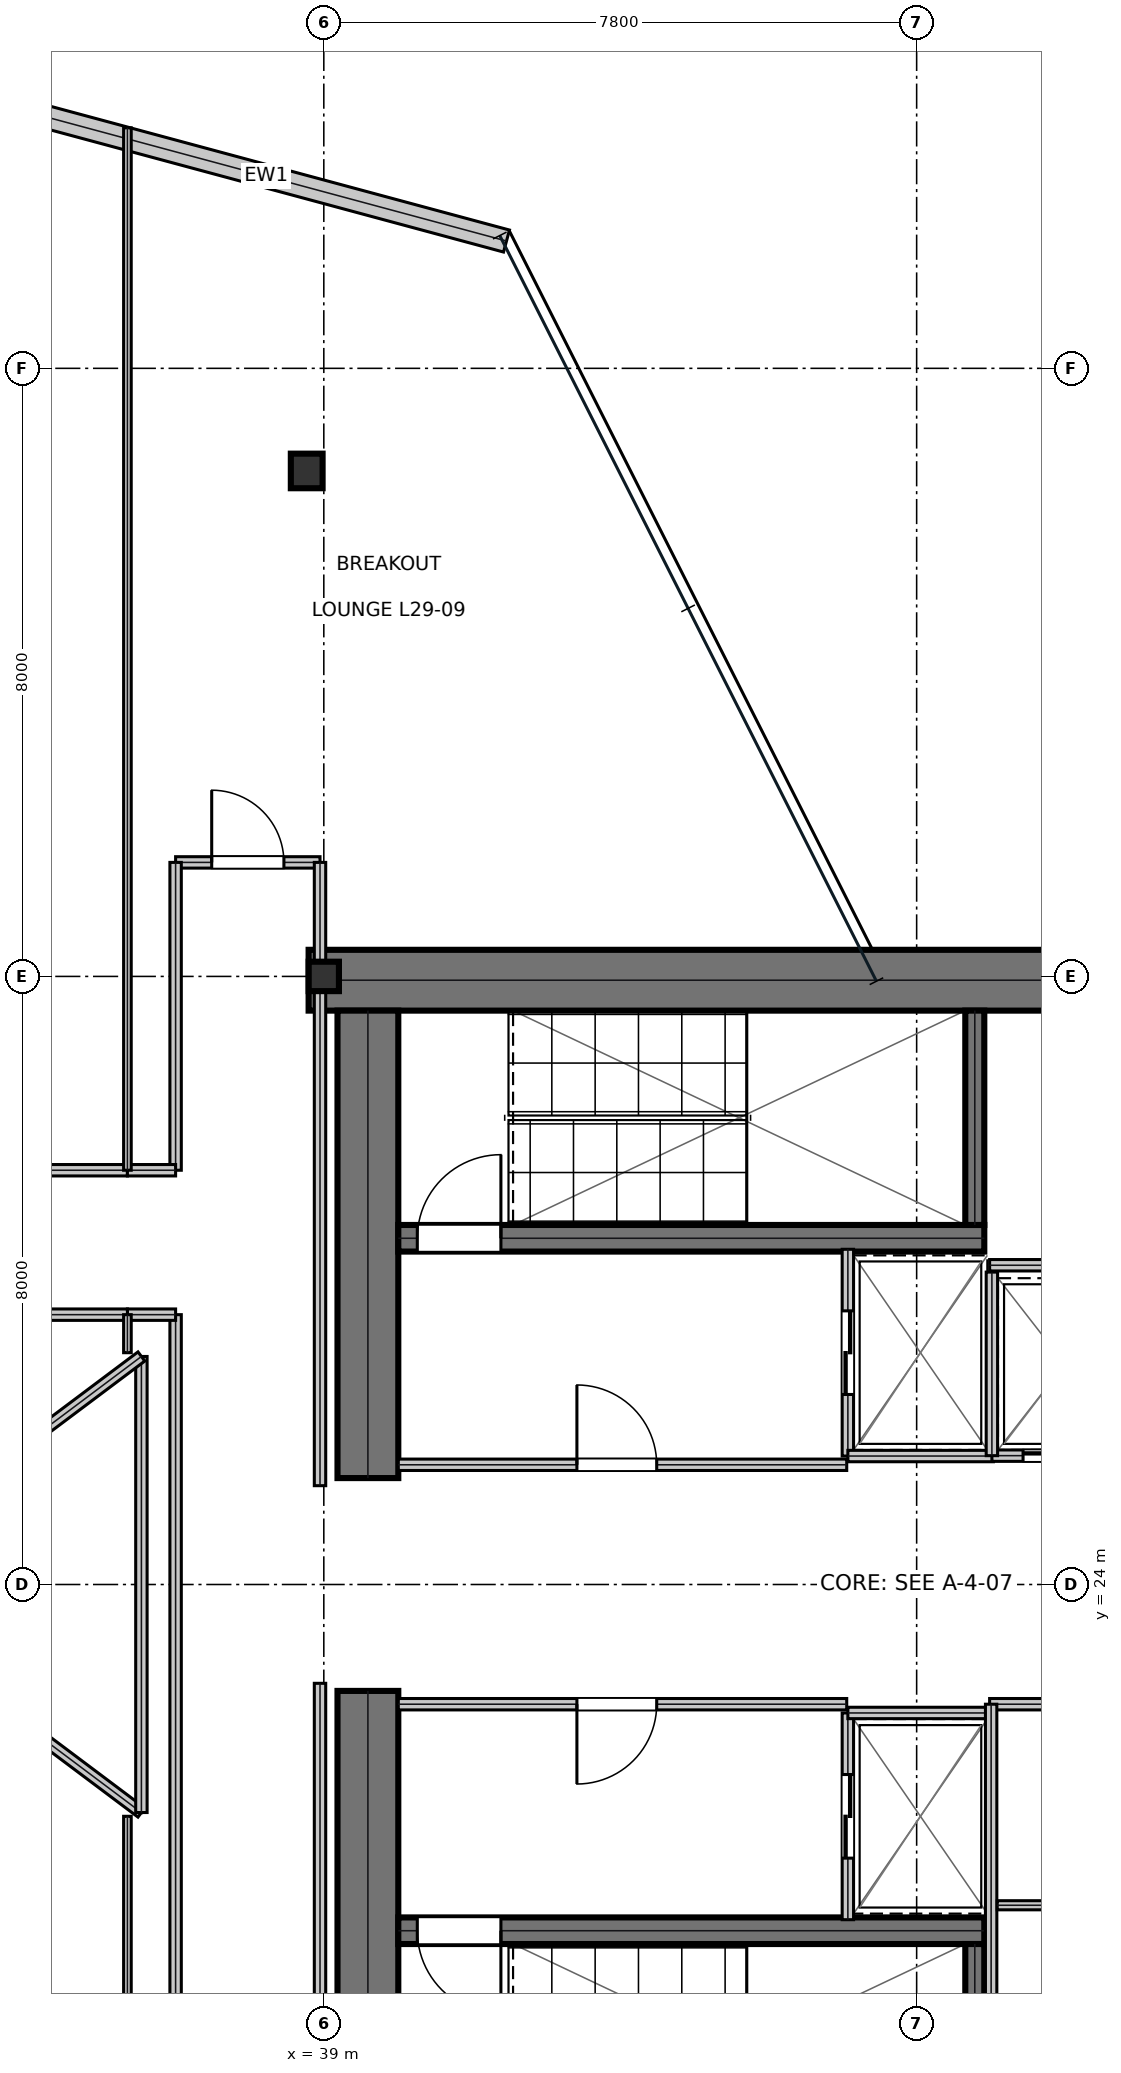
"""IFC4 building model, lengths in metres.
Left out: names, types, materials, properties, quantities, classifications, styles, units other than length and angle.
Written with IfcOpenShell. Run it as: python <this file> out.ifc"""

import sys

from ifc_helpers import new_model, si_unit, direction, frame, frame_2d, origin, origin_2d, place, context, subcontext, project, spatial, rectangle, i_section, extrude, element, fill, save


model = new_model("IFC4")
c1 = context("Model", 3, precision=1e-05, world=origin(), true_north=direction((0.0, 1.0)))
c2 = subcontext(c1, "Body", "Model", "MODEL_VIEW")
j1 = project(units=[si_unit("LENGTHUNIT", "METRE"), si_unit("PLANEANGLEUNIT", "RADIAN")], contexts=[c1])
p1 = place(None, origin())
s1 = spatial("IfcSite", under=j1, at=p1, CompositionType="ELEMENT")
p2 = place(p1, origin())
s2 = spatial("IfcBuilding", under=s1, at=p2, CompositionType="ELEMENT")
p3 = place(p2, frame((0.0, 0.0, 129.0)))
s3 = spatial("IfcBuildingStorey", under=s2, at=p3, CompositionType="ELEMENT", Elevation=129.0)
p4 = place(p3, frame((38.8, 31.95, 0.0), z_axis=(0.0, 0.0, 1.0), x_axis=(1.0, 0.0, 0.0)))
e1 = element("IfcWall", 1, at=p4, inside=s3, PredefinedType="SHEAR", context=c2, shape_type="SweptSolid", body=[
    extrude(rectangle(XDim=16.0, YDim=0.8, at=frame_2d((8.0, 0.0))), origin(), (0.0, 0.0, 1.0), 3.81),
])
for number, where, z_axis, x_axis in (
    (2, (39.58, 16.45, 0.0), (0.0, 0.0, 1.0), (0.0, 1.0, 0.0)),
    (3, (39.58, 25.4, 0.0), (0.0, 0.0, 1.0), (0.0, 1.0, 0.0)),
):
    element("IfcWall", number, at=place(p3, frame(where, z_axis=z_axis, x_axis=x_axis)), inside=s3, PredefinedType="SHEAR", context=c2, shape_type="SweptSolid", body=[
        extrude(rectangle(XDim=6.15, YDim=0.8, at=frame_2d((3.075, 0.0))), origin(), (0.0, 0.0, 1.0), 3.81),
    ])
p5 = place(p3, frame((39.98, 28.555, 0.0), z_axis=(0.0, 0.0, 1.0), x_axis=(1.0, 0.0, 0.0)))
e4 = element("IfcWall", 4, at=p5, inside=s3, PredefinedType="SHEAR", context=c2, shape_type="SweptSolid", body=[
    extrude(rectangle(XDim=7.71, YDim=0.35, at=frame_2d((3.855, 0.0))), origin(), (0.0, 0.0, 1.0), 3.81),
])
p6 = place(p5, frame((0.25, 0.0, 0.0)))
e5 = element("IfcOpeningElement", 5, at=p6, cuts=e4, PredefinedType="OPENING", context=c2, shape_type="SweptSolid", body=[
    extrude(rectangle(XDim=1.1, YDim=2.15, at=frame_2d((0.55, 1.075))), frame((0.0, 0.185, 0.0), z_axis=(0.0, -1.0, 0.0), x_axis=(1.0, 0.0, 0.0)), (0.0, 0.0, 1.0), 0.37),
])
p7 = place(p3, frame((39.98, 19.445, 0.0), z_axis=(0.0, 0.0, 1.0), x_axis=(1.0, 0.0, 0.0)))
e6 = element("IfcWall", 6, at=p7, inside=s3, PredefinedType="SHEAR", context=c2, shape_type="SweptSolid", body=[
    extrude(rectangle(XDim=7.71, YDim=0.35, at=frame_2d((3.855, 0.0))), origin(), (0.0, 0.0, 1.0), 3.81),
])
p8 = place(p7, frame((0.25, 0.0, 0.0)))
e7 = element("IfcOpeningElement", 7, at=p8, cuts=e6, PredefinedType="OPENING", context=c2, shape_type="SweptSolid", body=[
    extrude(rectangle(XDim=1.1, YDim=2.15, at=frame_2d((0.55, 1.075))), frame((0.0, 0.185, 0.0), z_axis=(0.0, -1.0, 0.0), x_axis=(1.0, 0.0, 0.0)), (0.0, 0.0, 1.0), 0.37),
])
for number, where, z_axis, x_axis in (
    (8, (47.565, 28.73, 0.0), (0.0, 0.0, 1.0), (0.0, 1.0, 0.0)),
    (9, (47.565, 16.45, 0.0), (0.0, 0.0, 1.0), (0.0, 1.0, 0.0)),
):
    element("IfcWall", number, at=place(p3, frame(where, z_axis=z_axis, x_axis=x_axis)), inside=s3, PredefinedType="SHEAR", context=c2, shape_type="SweptSolid", body=[
        extrude(rectangle(XDim=2.82, YDim=0.25, at=frame_2d((1.41, 0.0))), origin(), (0.0, 0.0, 1.0), 3.81),
    ])
p9 = place(p3, frame((39.0, 32.0, 0.0), z_axis=(0.0, 0.0, 1.0), x_axis=(1.0, 0.0, 0.0)))
e10 = element("IfcColumn", 10, at=p9, inside=s3, PredefinedType="COLUMN", context=c2, shape_type="SweptSolid", body=[
    extrude(i_section(OverallWidth=0.398, OverallDepth=0.387, WebThickness=0.021, FlangeThickness=0.033, at=origin_2d()), origin(), (0.0, 0.0, 1.0), 4.044),
])
p10 = place(p3, frame((38.775, 38.65, 0.016), z_axis=(0.0, 0.0, 1.0), x_axis=(1.0, 0.0, 0.0)))
e11 = element("IfcColumn", 11, at=p10, inside=s3, PredefinedType="COLUMN", context=c2, shape_type="SweptSolid", body=[
    extrude(i_section(OverallWidth=0.418, OverallDepth=0.455, WebThickness=0.042, FlangeThickness=0.068, at=origin_2d()), origin(), (0.0, 0.0, 1.0), 4.018),
])
p11 = place(p3, frame((41.404, 41.675, 0.0), z_axis=(0.0, 0.0, 1.0), x_axis=(-0.965531145086, 0.260287548434, 0.0)))
e12 = element("IfcWall", 12, at=p11, inside=s3, PredefinedType="STANDARD", context=c2, shape_type="SweptSolid", body=[
    extrude(rectangle(XDim=6.551, YDim=0.3, at=frame_2d((3.275, 0.0))), origin(), (0.0, 0.0, 1.0), 3.81),
])
p12 = place(p3, frame((39.98, 25.575, 0.0), z_axis=(0.0, 0.0, 1.0), x_axis=(1.0, 0.0, 0.0)))
e13 = element("IfcWall", 13, at=p12, inside=s3, PredefinedType="PARTITIONING", context=c2, shape_type="SweptSolid", body=[
    extrude(rectangle(XDim=5.9, YDim=0.15, at=frame_2d((2.95, 0.0))), origin(), (0.0, 0.0, 1.0), 3.81),
])
p13 = place(p12, frame((2.35, 0.0, 0.0)))
e14 = element("IfcOpeningElement", 14, at=p13, cuts=e13, PredefinedType="OPENING", context=c2, shape_type="SweptSolid", body=[
    extrude(rectangle(XDim=1.05, YDim=2.15, at=frame_2d((0.525, 1.075))), frame((0.0, 0.085, 0.0), z_axis=(0.0, -1.0, 0.0), x_axis=(1.0, 0.0, 0.0)), (0.0, 0.0, 1.0), 0.17),
])
p14 = place(p3, frame((39.98, 22.425, 0.0), z_axis=(0.0, 0.0, 1.0), x_axis=(1.0, 0.0, 0.0)))
e15 = element("IfcWall", 15, at=p14, inside=s3, PredefinedType="PARTITIONING", context=c2, shape_type="SweptSolid", body=[
    extrude(rectangle(XDim=5.9, YDim=0.15, at=frame_2d((2.95, 0.0))), origin(), (0.0, 0.0, 1.0), 3.81),
])
p15 = place(p14, frame((2.35, 0.0, 0.0)))
e16 = element("IfcOpeningElement", 16, at=p15, cuts=e15, PredefinedType="OPENING", context=c2, shape_type="SweptSolid", body=[
    extrude(rectangle(XDim=1.05, YDim=2.15, at=frame_2d((0.525, 1.075))), frame((0.0, 0.085, 0.0), z_axis=(0.0, -1.0, 0.0), x_axis=(1.0, 0.0, 0.0)), (0.0, 0.0, 1.0), 0.17),
])
p16 = place(p3, frame((45.895, 25.69, 0.0), z_axis=(0.0, 0.0, 1.0), x_axis=(0.0, 1.0, 0.0)))
e17 = element("IfcWall", 17, at=p16, inside=s3, PredefinedType="PARTITIONING", context=c2, shape_type="SweptSolid", body=[
    extrude(rectangle(XDim=2.72, YDim=0.15, at=frame_2d((1.36, 0.0))), origin(), (0.0, 0.0, 1.0), 3.81),
])
p17 = place(p16, frame((0.81, 0.0, 0.0)))
e18 = element("IfcOpeningElement", 18, at=p17, cuts=e17, PredefinedType="OPENING", context=c2, shape_type="SweptSolid", body=[
    extrude(rectangle(XDim=1.1, YDim=2.15, at=frame_2d((0.55, 1.075))), frame((0.0, 0.085, 0.0), z_axis=(0.0, -1.0, 0.0), x_axis=(1.0, 0.0, 0.0)), (0.0, 0.0, 1.0), 0.17),
])
p18 = place(p3, frame((45.895, 25.69, 0.0), z_axis=(0.0, 0.0, 1.0), x_axis=(1.0, 0.0, 0.0)))
e19 = element("IfcWall", 19, at=p18, inside=s3, PredefinedType="PARTITIONING", context=c2, shape_type="SweptSolid", body=[
    extrude(rectangle(XDim=1.915, YDim=0.15, at=frame_2d((0.958, 0.0))), origin(), (0.0, 0.0, 1.0), 3.81),
])
p19 = place(p3, frame((45.895, 19.59, 0.0), z_axis=(0.0, 0.0, 1.0), x_axis=(0.0, 1.0, 0.0)))
e20 = element("IfcWall", 20, at=p19, inside=s3, PredefinedType="PARTITIONING", context=c2, shape_type="SweptSolid", body=[
    extrude(rectangle(XDim=2.72, YDim=0.15, at=frame_2d((1.36, 0.0))), origin(), (0.0, 0.0, 1.0), 3.81),
])
p20 = place(p19, frame((0.81, 0.0, 0.0)))
e21 = element("IfcOpeningElement", 21, at=p20, cuts=e20, PredefinedType="OPENING", context=c2, shape_type="SweptSolid", body=[
    extrude(rectangle(XDim=1.1, YDim=2.15, at=frame_2d((0.55, 1.075))), frame((0.0, 0.085, 0.0), z_axis=(0.0, -1.0, 0.0), x_axis=(1.0, 0.0, 0.0)), (0.0, 0.0, 1.0), 0.17),
])
p21 = place(p3, frame((45.895, 22.31, 0.0), z_axis=(0.0, 0.0, 1.0), x_axis=(1.0, 0.0, 0.0)))
e22 = element("IfcWall", 22, at=p21, inside=s3, PredefinedType="PARTITIONING", context=c2, shape_type="SweptSolid", body=[
    extrude(rectangle(XDim=1.915, YDim=0.15, at=frame_2d((0.958, 0.0))), origin(), (0.0, 0.0, 1.0), 3.81),
])
p22 = place(p3, frame((47.79, 25.695, 0.0), z_axis=(0.0, 0.0, 1.0), x_axis=(1.0, 0.0, 0.0)))
e23 = element("IfcWall", 23, at=p22, inside=s3, PredefinedType="PARTITIONING", context=c2, shape_type="SweptSolid", body=[
    extrude(rectangle(XDim=1.92, YDim=0.15, at=frame_2d((0.96, 0.0))), origin(), (0.0, 0.0, 1.0), 3.81),
])
p23 = place(p22, frame((0.41, 0.0, 0.0)))
e24 = element("IfcOpeningElement", 24, at=p23, cuts=e23, PredefinedType="OPENING", context=c2, shape_type="SweptSolid", body=[
    extrude(rectangle(XDim=1.1, YDim=2.15, at=frame_2d((0.55, 1.075))), frame((0.0, 0.085, 0.0), z_axis=(0.0, -1.0, 0.0), x_axis=(1.0, 0.0, 0.0)), (0.0, 0.0, 1.0), 0.17),
])
p24 = place(p3, frame((47.79, 25.695, 0.0), z_axis=(0.0, 0.0, 1.0), x_axis=(0.0, 1.0, 0.0)))
e25 = element("IfcWall", 25, at=p24, inside=s3, PredefinedType="PARTITIONING", context=c2, shape_type="SweptSolid", body=[
    extrude(rectangle(XDim=2.415, YDim=0.15, at=frame_2d((1.208, 0.0))), origin(), (0.0, 0.0, 1.0), 3.81),
])
p25 = place(p3, frame((47.76, 22.425, 0.0), z_axis=(0.0, 0.0, 1.0), x_axis=(1.0, 0.0, 0.0)))
e26 = element("IfcWall", 26, at=p25, inside=s3, PredefinedType="PARTITIONING", context=c2, shape_type="SweptSolid", body=[
    extrude(rectangle(XDim=1.96, YDim=0.15, at=frame_2d((0.98, 0.0))), origin(), (0.0, 0.0, 1.0), 3.81),
])
p26 = place(p3, frame((47.78, 16.45, 0.0), z_axis=(0.0, 0.0, 1.0), x_axis=(0.0, 1.0, 0.0)))
e27 = element("IfcWall", 27, at=p26, inside=s3, PredefinedType="PARTITIONING", context=c2, shape_type="SweptSolid", body=[
    extrude(rectangle(XDim=5.975, YDim=0.15, at=frame_2d((2.988, 0.0))), origin(), (0.0, 0.0, 1.0), 3.81),
])
p27 = place(p3, frame((47.86, 19.78, 0.0), z_axis=(0.0, 0.0, 1.0), x_axis=(1.0, 0.0, 0.0)))
e28 = element("IfcWall", 28, at=p27, inside=s3, PredefinedType="PARTITIONING", context=c2, shape_type="SweptSolid", body=[
    extrude(rectangle(XDim=1.76, YDim=0.12, at=frame_2d((0.88, 0.0))), origin(), (0.0, 0.0, 1.0), 3.81),
])
p28 = place(p3, frame((47.76, 28.2, 0.0), z_axis=(0.0, 0.0, 1.0), x_axis=(1.0, 0.0, 0.0)))
e29 = element("IfcWall", 29, at=p28, inside=s3, PredefinedType="PARTITIONING", context=c2, shape_type="SweptSolid", body=[
    extrude(rectangle(XDim=1.99, YDim=0.15, at=frame_2d((0.995, 0.0))), origin(), (0.0, 0.0, 1.0), 3.81),
])
p29 = place(p3, frame((37.05, 33.5, 0.0), z_axis=(0.0, 0.0, 1.0), x_axis=(1.0, 0.0, 0.0)))
e30 = element("IfcWall", 30, at=p29, inside=s3, PredefinedType="PARTITIONING", context=c2, shape_type="SweptSolid", body=[
    extrude(rectangle(XDim=1.9, YDim=0.15, at=frame_2d((0.95, 0.0))), origin(), (0.0, 0.0, 1.0), 3.19),
])
p30 = place(p29, frame((0.475, 0.0, 0.0)))
e31 = element("IfcOpeningElement", 31, at=p30, cuts=e30, PredefinedType="OPENING", context=c2, shape_type="SweptSolid", body=[
    extrude(rectangle(XDim=0.95, YDim=2.15, at=frame_2d((0.475, 1.075))), frame((0.0, 0.085, 0.0), z_axis=(0.0, -1.0, 0.0), x_axis=(1.0, 0.0, 0.0)), (0.0, 0.0, 1.0), 0.17),
])
p31 = place(p3, frame((37.05, 14.5, 0.0), z_axis=(0.0, 0.0, 1.0), x_axis=(0.0, 1.0, 0.0)))
e32 = element("IfcWall", 32, at=p31, inside=s3, PredefinedType="PARTITIONING", context=c2, shape_type="SweptSolid", body=[
    extrude(rectangle(XDim=13.05, YDim=0.15, at=frame_2d((6.525, 0.0))), origin(), (0.0, 0.0, 1.0), 3.19),
])
p32 = place(p3, frame((38.95, 14.5, 0.0), z_axis=(0.0, 0.0, 1.0), x_axis=(0.0, 1.0, 0.0)))
e33 = element("IfcWall", 33, at=p32, inside=s3, PredefinedType="PARTITIONING", context=c2, shape_type="SweptSolid", body=[
    extrude(rectangle(XDim=8.2, YDim=0.15, at=frame_2d((4.1, 0.0))), origin(), (0.0, 0.0, 1.0), 3.19),
])
p33 = place(p3, frame((36.416, 27.55, 0.0), z_axis=(0.0, 0.0, 1.0), x_axis=(1.0, 0.0, 0.0)))
e34 = element("IfcWall", 34, at=p33, inside=s3, PredefinedType="PARTITIONING", context=c2, shape_type="SweptSolid", body=[
    extrude(rectangle(XDim=0.634, YDim=0.15, at=frame_2d((0.317, 0.0))), origin(), (0.0, 0.0, 1.0), 3.443),
])
for number, where, z_axis, x_axis in (
    (35, (29.4, 27.55, 0.0), (0.0, 0.0, 1.0), (1.0, 0.0, 0.0)),
    (36, (29.4, 29.45, 0.0), (0.0, 0.0, 1.0), (1.0, 0.0, 0.0)),
):
    element("IfcWall", number, at=place(p3, frame(where, z_axis=z_axis, x_axis=x_axis)), inside=s3, PredefinedType="PARTITIONING", context=c2, shape_type="SweptSolid", body=[
        extrude(rectangle(XDim=7.016, YDim=0.15, at=frame_2d((3.508, 0.0))), origin(), (0.0, 0.0, 1.0), 3.19),
    ])
p34 = place(p3, frame((38.95, 25.3, 0.0), z_axis=(0.0, 0.0, 1.0), x_axis=(0.0, 1.0, 0.0)))
e37 = element("IfcWall", 37, at=p34, inside=s3, PredefinedType="PARTITIONING", context=c2, shape_type="SweptSolid", body=[
    extrude(rectangle(XDim=8.2, YDim=0.15, at=frame_2d((4.1, 0.0))), origin(), (0.0, 0.0, 1.0), 3.19),
])
p35 = place(p3, frame((37.05, 29.45, 0.0), z_axis=(0.0, 0.0, 1.0), x_axis=(0.0, 1.0, 0.0)))
e38 = element("IfcWall", 38, at=p35, inside=s3, PredefinedType="PARTITIONING", context=c2, shape_type="SweptSolid", body=[
    extrude(rectangle(XDim=4.05, YDim=0.15, at=frame_2d((2.025, 0.0))), origin(), (0.0, 0.0, 1.0), 3.19),
])
p36 = place(p3, frame((36.416, 29.45, 0.0), z_axis=(0.0, 0.0, 1.0), x_axis=(1.0, 0.0, 0.0)))
e39 = element("IfcWall", 39, at=p36, inside=s3, PredefinedType="PARTITIONING", context=c2, shape_type="SweptSolid", body=[
    extrude(rectangle(XDim=0.634, YDim=0.15, at=frame_2d((0.317, 0.0))), origin(), (0.0, 0.0, 1.0), 3.81),
])
p37 = place(p3, frame((36.416, 4.836, 0.0), z_axis=(0.0, 0.0, 1.0), x_axis=(0.0, 1.0, 0.0)))
e40 = element("IfcWall", 40, at=p37, inside=s3, PredefinedType="PARTITIONING", context=c2, shape_type="SweptSolid", body=[
    extrude(rectangle(XDim=16.115, YDim=0.1, at=frame_2d((8.057, 0.0))), origin(), (0.0, 0.0, 1.0), 3.19),
])
p38 = place(p3, frame((36.416, 27.05, 0.0), z_axis=(0.0, 0.0, 1.0), x_axis=(0.0, 1.0, 0.0)))
e41 = element("IfcWall", 41, at=p38, inside=s3, PredefinedType="PARTITIONING", context=c2, shape_type="SweptSolid", body=[
    extrude(rectangle(XDim=0.5, YDim=0.1, at=frame_2d((0.25, 0.0))), origin(), (0.0, 0.0, 1.0), 3.81),
])
p39 = place(p3, frame((36.416, 29.45, 0.0), z_axis=(0.0, 0.0, 1.0), x_axis=(0.0, 1.0, 0.0)))
e42 = element("IfcWall", 42, at=p39, inside=s3, PredefinedType="PARTITIONING", context=c2, shape_type="SweptSolid", body=[
    extrude(rectangle(XDim=13.714, YDim=0.1, at=frame_2d((6.857, 0.0))), origin(), (0.0, 0.0, 1.0), 3.19),
])
p40 = place(p3, frame((32.6, 24.0, 0.0), z_axis=(0.0, 0.0, 1.0), x_axis=(0.8, -0.6, 0.0)))
e43 = element("IfcWall", 43, at=p40, inside=s3, PredefinedType="MOVABLE", context=c2, shape_type="SweptSolid", body=[
    extrude(rectangle(XDim=5.0, YDim=0.15, at=frame_2d((2.5, 0.0))), origin(), (0.0, 0.0, 1.0), 3.81),
])
p41 = place(p3, frame((36.6, 21.0, 0.0), z_axis=(0.0, 0.0, 1.0), x_axis=(0.0, 1.0, 0.0)))
e44 = element("IfcWall", 44, at=p41, inside=s3, PredefinedType="MOVABLE", context=c2, shape_type="SweptSolid", body=[
    extrude(rectangle(XDim=6.0, YDim=0.15, at=frame_2d((3.0, 0.0))), origin(), (0.0, 0.0, 1.0), 3.81),
])
p42 = place(p3, frame((36.6, 27.0, 0.0), z_axis=(0.0, 0.0, 1.0), x_axis=(-0.8, -0.6, 0.0)))
e45 = element("IfcWall", 45, at=p42, inside=s3, PredefinedType="MOVABLE", context=c2, shape_type="SweptSolid", body=[
    extrude(rectangle(XDim=5.0, YDim=0.15, at=frame_2d((2.5, 0.0))), origin(), (0.0, 0.0, 1.0), 3.81),
])
p43 = place(p13, origin())
e46 = element("IfcDoor", 46, at=p43, inside=s3, OperationType="SINGLE_SWING_LEFT", PredefinedType="DOOR", context=c2, shape_type="SweptSolid", body=[
    extrude(rectangle(XDim=1.05, YDim=2.15, at=frame_2d((0.525, 1.075))), frame((0.0, 0.025, 0.0), z_axis=(0.0, -1.0, 0.0), x_axis=(1.0, 0.0, 0.0)), (0.0, 0.0, 1.0), 0.05),
])
fill(e14, e46)
p44 = place(p15, frame((1.05, 0.0, 0.0), z_axis=(0.0, 0.0, 1.0), x_axis=(-1.0, 0.0, 0.0)))
e47 = element("IfcDoor", 47, at=p44, inside=s3, OperationType="SINGLE_SWING_RIGHT", PredefinedType="DOOR", context=c2, shape_type="SweptSolid", body=[
    extrude(rectangle(XDim=1.05, YDim=2.15, at=frame_2d((0.525, 1.075))), frame((0.0, 0.025, 0.0), z_axis=(0.0, -1.0, 0.0), x_axis=(1.0, 0.0, 0.0)), (0.0, 0.0, 1.0), 0.05),
])
fill(e16, e47)
p45 = place(p17, frame((1.1, 0.0, 0.0), z_axis=(0.0, 0.0, 1.0), x_axis=(-1.0, 0.0, 0.0)))
e48 = element("IfcDoor", 48, at=p45, inside=s3, OperationType="DOUBLE_DOOR_SLIDING", PredefinedType="DOOR", context=c2, shape_type="SweptSolid", body=[
    extrude(rectangle(XDim=1.1, YDim=2.15, at=frame_2d((0.55, 1.075))), frame((0.0, 0.025, 0.0), z_axis=(0.0, -1.0, 0.0), x_axis=(1.0, 0.0, 0.0)), (0.0, 0.0, 1.0), 0.05),
])
fill(e18, e48)
p46 = place(p20, frame((1.1, 0.0, 0.0), z_axis=(0.0, 0.0, 1.0), x_axis=(-1.0, 0.0, 0.0)))
e49 = element("IfcDoor", 49, at=p46, inside=s3, OperationType="DOUBLE_DOOR_SLIDING", PredefinedType="DOOR", context=c2, shape_type="SweptSolid", body=[
    extrude(rectangle(XDim=1.1, YDim=2.15, at=frame_2d((0.55, 1.075))), frame((0.0, 0.025, 0.0), z_axis=(0.0, -1.0, 0.0), x_axis=(1.0, 0.0, 0.0)), (0.0, 0.0, 1.0), 0.05),
])
fill(e21, e49)
p47 = place(p23, frame((1.1, 0.0, 0.0), z_axis=(0.0, 0.0, 1.0), x_axis=(-1.0, 0.0, 0.0)))
e50 = element("IfcDoor", 50, at=p47, inside=s3, OperationType="DOUBLE_DOOR_SLIDING", PredefinedType="DOOR", context=c2, shape_type="SweptSolid", body=[
    extrude(rectangle(XDim=1.1, YDim=2.15, at=frame_2d((0.55, 1.075))), frame((0.0, 0.025, 0.0), z_axis=(0.0, -1.0, 0.0), x_axis=(1.0, 0.0, 0.0)), (0.0, 0.0, 1.0), 0.05),
])
fill(e24, e50)
p48 = place(p30, origin())
e51 = element("IfcDoor", 51, at=p48, inside=s3, OperationType="SINGLE_SWING_LEFT", PredefinedType="DOOR", context=c2, shape_type="SweptSolid", body=[
    extrude(rectangle(XDim=0.95, YDim=2.15, at=frame_2d((0.475, 1.075))), frame((0.0, 0.025, 0.0), z_axis=(0.0, -1.0, 0.0), x_axis=(1.0, 0.0, 0.0)), (0.0, 0.0, 1.0), 0.05),
])
fill(e31, e51)
p49 = place(p6, origin())
e52 = element("IfcDoor", 52, at=p49, inside=s3, OperationType="SINGLE_SWING_RIGHT", PredefinedType="DOOR", context=c2, shape_type="SweptSolid", body=[
    extrude(rectangle(XDim=1.1, YDim=2.15, at=frame_2d((0.55, 1.075))), frame((0.0, 0.025, 0.0), z_axis=(0.0, -1.0, 0.0), x_axis=(1.0, 0.0, 0.0)), (0.0, 0.0, 1.0), 0.05),
])
fill(e5, e52)
p50 = place(p8, frame((1.1, 0.0, 0.0), z_axis=(0.0, 0.0, 1.0), x_axis=(-1.0, 0.0, 0.0)))
e53 = element("IfcDoor", 53, at=p50, inside=s3, OperationType="SINGLE_SWING_LEFT", PredefinedType="DOOR", context=c2, shape_type="SweptSolid", body=[
    extrude(rectangle(XDim=1.1, YDim=2.15, at=frame_2d((0.55, 1.075))), frame((0.0, 0.025, 0.0), z_axis=(0.0, -1.0, 0.0), x_axis=(1.0, 0.0, 0.0)), (0.0, 0.0, 1.0), 0.05),
])
fill(e7, e53)
save(model, sys.argv[1])
